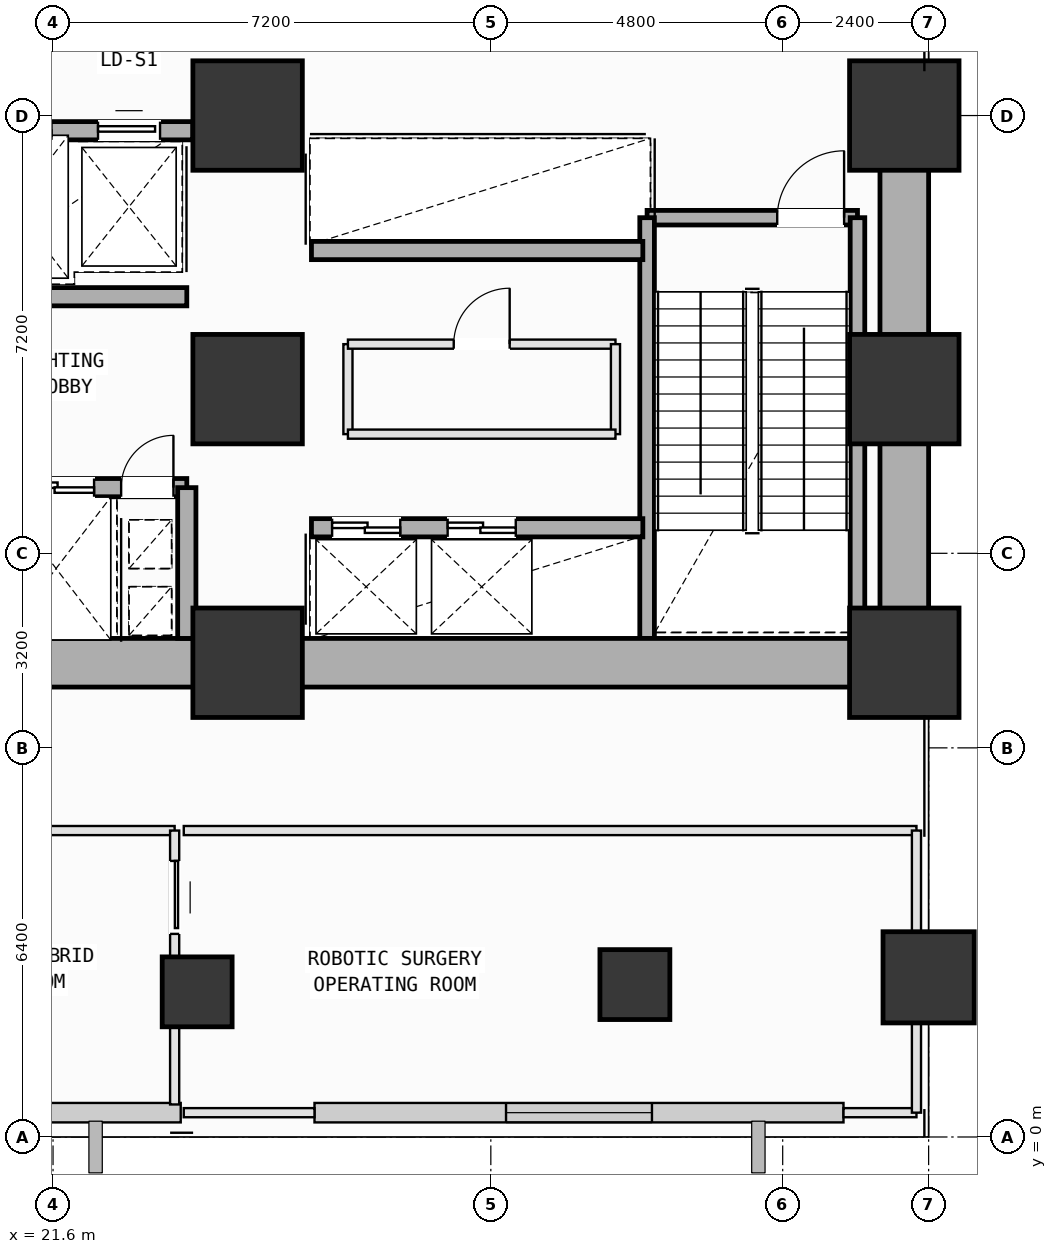
"""IFC4 building model, lengths in metres.
Left out: names, types, materials, properties, quantities, classifications, styles, units other than length and angle.
Written with IfcOpenShell. Run it as: python <this file> out.ifc"""

import sys

from ifc_helpers import new_model, si_unit, direction, frame, frame_2d, origin, origin_2d, place, context, subcontext, project, spatial, rectangle, extrude, element, fill, save


model = new_model("IFC4")
c1 = context("Model", 3, precision=1e-05, world=origin(), true_north=direction((0.0, 1.0)))
c2 = subcontext(c1, "Body", "Model", "MODEL_VIEW")
j1 = project(units=[si_unit("LENGTHUNIT", "METRE"), si_unit("PLANEANGLEUNIT", "RADIAN")], contexts=[c1])
p1 = place(None, origin())
s1 = spatial("IfcSite", under=j1, at=p1, CompositionType="ELEMENT")
p2 = place(p1, origin())
s2 = spatial("IfcBuilding", under=s1, at=p2, CompositionType="ELEMENT")
p3 = place(p2, frame((0.0, 0.0, 21.6)))
s3 = spatial("IfcBuildingStorey", under=s2, at=p3, CompositionType="ELEMENT", Elevation=21.6)
for number, where, z_axis, x_axis in (
    (1, (24.8, 7.8, 0.0), (0.0, 0.0, 1.0), (1.0, 0.0, 0.0)),
    (2, (24.8, 12.3, 0.0), (0.0, 0.0, 1.0), (1.0, 0.0, 0.0)),
    (3, (24.8, 16.8, 0.0), (0.0, 0.0, 1.0), (1.0, 0.0, 0.0)),
    (4, (35.6, 7.8, 0.0), (0.0, 0.0, 1.0), (1.0, 0.0, 0.0)),
    (5, (35.6, 12.3, 0.0), (0.0, 0.0, 1.0), (1.0, 0.0, 0.0)),
    (6, (35.6, 16.8, 0.0), (0.0, 0.0, 1.0), (1.0, 0.0, 0.0)),
):
    element("IfcColumn", number, at=place(p3, frame(where, z_axis=z_axis, x_axis=x_axis)), inside=s3, PredefinedType="COLUMN", context=c2, shape_type="SweptSolid", body=[
        extrude(rectangle(XDim=1.8, YDim=1.8, at=origin_2d()), origin(), (0.0, 0.0, 1.0), 5.4),
    ])
p4 = place(p3, frame((36.0, 2.626, 0.0), z_axis=(0.0, 0.0, 1.0), x_axis=(1.0, 0.0, 0.0)))
e7 = element("IfcColumn", 7, at=p4, inside=s3, PredefinedType="PILASTER", context=c2, shape_type="SweptSolid", body=[
    extrude(rectangle(XDim=1.5, YDim=1.5, at=origin_2d()), origin(), (0.0, 0.0, 1.0), 5.4),
])
for number, where, z_axis, x_axis in (
    (8, (23.97, 2.387, 0.0), (0.0, 0.0, 1.0), (1.0, 0.0, 0.0)),
    (9, (31.169, 2.507, 0.0), (0.0, 0.0, 1.0), (1.0, 0.0, 0.0)),
):
    element("IfcColumn", number, at=place(p3, frame(where, z_axis=z_axis, x_axis=x_axis)), inside=s3, PredefinedType="COLUMN", context=c2, shape_type="SweptSolid", body=[
        extrude(rectangle(XDim=1.15, YDim=1.15, at=origin_2d()), origin(), (0.0, 0.0, 1.0), 5.4),
    ])
p5 = place(p3, frame((23.7, 0.4, 0.0), z_axis=(0.0, 0.0, 1.0), x_axis=(-1.0, 0.0, 0.0)))
e10 = element("IfcWall", 10, at=p5, inside=s3, PredefinedType="SOLIDWALL", context=c2, shape_type="SweptSolid", body=[
    extrude(rectangle(XDim=8.6, YDim=0.32, at=frame_2d((4.3, 0.0))), origin(), (0.0, 0.0, 1.0), 4.18),
])
p6 = place(p5, frame((3.315, 0.0, 0.8)))
e11 = element("IfcOpeningElement", 11, at=p6, cuts=e10, PredefinedType="OPENING", context=c2, shape_type="SweptSolid", body=[
    extrude(rectangle(XDim=2.4, YDim=2.2, at=frame_2d((1.2, 1.1))), frame((0.0, 0.17, 0.0), z_axis=(0.0, -1.0, 0.0), x_axis=(1.0, 0.0, 0.0)), (0.0, 0.0, 1.0), 0.34),
])
p7 = place(p3, frame((34.6, 0.4, 0.0), z_axis=(0.0, 0.0, 1.0), x_axis=(-1.0, 0.0, 0.0)))
e12 = element("IfcWall", 12, at=p7, inside=s3, PredefinedType="SOLIDWALL", context=c2, shape_type="SweptSolid", body=[
    extrude(rectangle(XDim=8.7, YDim=0.32, at=frame_2d((4.35, 0.0))), origin(), (0.0, 0.0, 1.0), 4.18),
])
p8 = place(p7, frame((3.15, 0.0, 0.8)))
e13 = element("IfcOpeningElement", 13, at=p8, cuts=e12, PredefinedType="OPENING", context=c2, shape_type="SweptSolid", body=[
    extrude(rectangle(XDim=2.4, YDim=2.2, at=frame_2d((1.2, 1.1))), frame((0.0, 0.17, 0.0), z_axis=(0.0, -1.0, 0.0), x_axis=(1.0, 0.0, 0.0)), (0.0, 0.0, 1.0), 0.34),
])
p9 = place(p3, frame((31.37, 15.12, 0.0), z_axis=(0.0, 0.0, 1.0), x_axis=(1.0, 0.0, 0.0)))
e14 = element("IfcWall", 14, at=p9, inside=s3, PredefinedType="SOLIDWALL", context=c2, shape_type="SweptSolid", body=[
    extrude(rectangle(XDim=3.46, YDim=0.24, at=frame_2d((1.73, 0.0))), origin(), (0.0, 0.0, 1.0), 5.1),
])
p10 = place(p9, frame((2.14, 0.0, 0.0)))
e15 = element("IfcOpeningElement", 15, at=p10, cuts=e14, PredefinedType="OPENING", context=c2, shape_type="SweptSolid", body=[
    extrude(rectangle(XDim=1.1, YDim=2.15, at=frame_2d((0.55, 1.075))), frame((0.0, 0.13, 0.0), z_axis=(0.0, -1.0, 0.0), x_axis=(1.0, 0.0, 0.0)), (0.0, 0.0, 1.0), 0.26),
])
for number, where, z_axis, x_axis in (
    (16, (34.83, 15.12, 0.0), (0.0, 0.0, 1.0), (0.0, -1.0, 0.0)),
    (17, (31.37, 8.2, 0.0), (0.0, 0.0, 1.0), (0.0, 1.0, 0.0)),
):
    element("IfcWall", number, at=place(p3, frame(where, z_axis=z_axis, x_axis=x_axis)), inside=s3, PredefinedType="SOLIDWALL", context=c2, shape_type="SweptSolid", body=[
        extrude(rectangle(XDim=6.92, YDim=0.24, at=frame_2d((3.46, 0.0))), origin(), (0.0, 0.0, 1.0), 5.1),
    ])
for number, where, z_axis, x_axis in (
    (18, (14.0, 7.8, 0.0), (0.0, 0.0, 1.0), (1.0, 0.0, 0.0)),
    (19, (24.8, 7.8, 0.0), (0.0, 0.0, 1.0), (1.0, 0.0, 0.0)),
):
    element("IfcWall", number, at=place(p3, frame(where, z_axis=z_axis, x_axis=x_axis)), inside=s3, PredefinedType="SHEAR", context=c2, shape_type="SweptSolid", body=[
        extrude(rectangle(XDim=10.8, YDim=0.8, at=frame_2d((5.4, 0.0))), origin(), (0.0, 0.0, 1.0), 5.1),
    ])
p11 = place(p3, frame((35.6, 7.8, 0.0), z_axis=(0.0, 0.0, 1.0), x_axis=(0.0, 1.0, 0.0)))
e20 = element("IfcWall", 20, at=p11, inside=s3, PredefinedType="SHEAR", context=c2, shape_type="SweptSolid", body=[
    extrude(rectangle(XDim=9.0, YDim=0.8, at=frame_2d((4.5, 0.0))), origin(), (0.0, 0.0, 1.0), 5.1),
])
p12 = place(p3, frame((19.85, 16.55, 0.0), z_axis=(0.0, 0.0, 1.0), x_axis=(1.0, 0.0, 0.0)))
e21 = element("IfcWall", 21, at=p12, inside=s3, PredefinedType="SOLIDWALL", context=c2, shape_type="SweptSolid", body=[
    extrude(rectangle(XDim=4.05, YDim=0.3, at=frame_2d((2.025, 0.0))), origin(), (0.0, 0.0, 1.0), 5.1),
])
p13 = place(p12, frame((0.475, 0.0, 0.0)))
e22 = element("IfcOpeningElement", 22, at=p13, cuts=e21, PredefinedType="OPENING", context=c2, shape_type="SweptSolid", body=[
    extrude(rectangle(XDim=1.25, YDim=2.18, at=frame_2d((0.625, 1.09))), frame((0.0, 0.16, 0.0), z_axis=(0.0, -1.0, 0.0), x_axis=(1.0, 0.0, 0.0)), (0.0, 0.0, 1.0), 0.32),
])
p14 = place(p12, frame((2.49, 0.0, 0.0)))
e23 = element("IfcOpeningElement", 23, at=p14, cuts=e21, PredefinedType="OPENING", context=c2, shape_type="SweptSolid", body=[
    extrude(rectangle(XDim=1.02, YDim=2.12, at=frame_2d((0.51, 1.06))), frame((0.0, 0.16, 0.0), z_axis=(0.0, -1.0, 0.0), x_axis=(1.0, 0.0, 0.0)), (0.0, 0.0, 1.0), 0.32),
])
p15 = place(p3, frame((18.5, 10.68, 0.0), z_axis=(0.0, 0.0, 1.0), x_axis=(1.0, 0.0, 0.0)))
e24 = element("IfcWall", 24, at=p15, inside=s3, PredefinedType="SOLIDWALL", context=c2, shape_type="SweptSolid", body=[
    extrude(rectangle(XDim=5.3, YDim=0.3, at=frame_2d((2.65, 0.0))), origin(), (0.0, 0.0, 1.0), 5.1),
])
p16 = place(p15, frame((4.22, 0.0, 0.0)))
e25 = element("IfcOpeningElement", 25, at=p16, cuts=e24, PredefinedType="OPENING", context=c2, shape_type="SweptSolid", body=[
    extrude(rectangle(XDim=0.86, YDim=2.06, at=frame_2d((0.43, 1.03))), frame((0.0, 0.16, 0.0), z_axis=(0.0, -1.0, 0.0), x_axis=(1.0, 0.0, 0.0)), (0.0, 0.0, 1.0), 0.32),
])
p17 = place(p15, frame((0.425, 0.0, 0.0)))
e26 = element("IfcOpeningElement", 26, at=p17, cuts=e24, PredefinedType="OPENING", context=c2, shape_type="SweptSolid", body=[
    extrude(rectangle(XDim=1.25, YDim=2.18, at=frame_2d((0.625, 1.09))), frame((0.0, 0.16, 0.0), z_axis=(0.0, -1.0, 0.0), x_axis=(1.0, 0.0, 0.0)), (0.0, 0.0, 1.0), 0.32),
])
p18 = place(p15, frame((2.525, 0.0, 0.0)))
e27 = element("IfcOpeningElement", 27, at=p18, cuts=e24, PredefinedType="OPENING", context=c2, shape_type="SweptSolid", body=[
    extrude(rectangle(XDim=1.25, YDim=2.18, at=frame_2d((0.625, 1.09))), frame((0.0, 0.16, 0.0), z_axis=(0.0, -1.0, 0.0), x_axis=(1.0, 0.0, 0.0)), (0.0, 0.0, 1.0), 0.32),
])
p19 = place(p3, frame((18.5, 13.82, 0.0), z_axis=(0.0, 0.0, 1.0), x_axis=(1.0, 0.0, 0.0)))
e28 = element("IfcWall", 28, at=p19, inside=s3, PredefinedType="SOLIDWALL", context=c2, shape_type="SweptSolid", body=[
    extrude(rectangle(XDim=5.3, YDim=0.3, at=frame_2d((2.65, 0.0))), origin(), (0.0, 0.0, 1.0), 5.1),
])
p20 = place(p19, frame((0.18, 0.0, 0.0)))
e29 = element("IfcOpeningElement", 29, at=p20, cuts=e28, PredefinedType="OPENING", context=c2, shape_type="SweptSolid", body=[
    extrude(rectangle(XDim=1.1, YDim=2.15, at=frame_2d((0.55, 1.075))), frame((0.0, 0.16, 0.0), z_axis=(0.0, -1.0, 0.0), x_axis=(1.0, 0.0, 0.0)), (0.0, 0.0, 1.0), 0.32),
])
p21 = place(p3, frame((23.8, 8.2, 0.0), z_axis=(0.0, 0.0, 1.0), x_axis=(0.0, 1.0, 0.0)))
e30 = element("IfcWall", 30, at=p21, inside=s3, PredefinedType="SOLIDWALL", context=c2, shape_type="SweptSolid", body=[
    extrude(rectangle(XDim=2.48, YDim=0.3, at=frame_2d((1.24, 0.0))), origin(), (0.0, 0.0, 1.0), 5.1),
])
p22 = place(p3, frame((25.85, 10.02, 0.0), z_axis=(0.0, 0.0, 1.0), x_axis=(1.0, 0.0, 0.0)))
e31 = element("IfcWall", 31, at=p22, inside=s3, PredefinedType="SOLIDWALL", context=c2, shape_type="SweptSolid", body=[
    extrude(rectangle(XDim=5.45, YDim=0.3, at=frame_2d((2.725, 0.0))), origin(), (0.0, 0.0, 1.0), 5.1),
])
p23 = place(p22, frame((0.34, 0.0, 0.0)))
e32 = element("IfcOpeningElement", 32, at=p23, cuts=e31, PredefinedType="OPENING", context=c2, shape_type="SweptSolid", body=[
    extrude(rectangle(XDim=1.12, YDim=2.15, at=frame_2d((0.56, 1.075))), frame((0.0, 0.16, 0.0), z_axis=(0.0, -1.0, 0.0), x_axis=(1.0, 0.0, 0.0)), (0.0, 0.0, 1.0), 0.32),
])
p24 = place(p22, frame((2.24, 0.0, 0.0)))
e33 = element("IfcOpeningElement", 33, at=p24, cuts=e31, PredefinedType="OPENING", context=c2, shape_type="SweptSolid", body=[
    extrude(rectangle(XDim=1.12, YDim=2.15, at=frame_2d((0.56, 1.075))), frame((0.0, 0.16, 0.0), z_axis=(0.0, -1.0, 0.0), x_axis=(1.0, 0.0, 0.0)), (0.0, 0.0, 1.0), 0.32),
])
p25 = place(p3, frame((25.85, 14.58, 0.0), z_axis=(0.0, 0.0, 1.0), x_axis=(1.0, 0.0, 0.0)))
e34 = element("IfcWall", 34, at=p25, inside=s3, PredefinedType="SOLIDWALL", context=c2, shape_type="SweptSolid", body=[
    extrude(rectangle(XDim=5.45, YDim=0.3, at=frame_2d((2.725, 0.0))), origin(), (0.0, 0.0, 1.0), 5.1),
])
p26 = place(p3, frame((26.45, 11.56, 0.0), z_axis=(0.0, 0.0, 1.0), x_axis=(0.0, 1.0, 0.0)))
e35 = element("IfcWall", 35, at=p26, inside=s3, PredefinedType="PARTITIONING", context=c2, shape_type="SweptSolid", body=[
    extrude(rectangle(XDim=1.48, YDim=0.15, at=frame_2d((0.74, 0.0))), origin(), (0.0, 0.0, 1.0), 5.1),
])
p27 = place(p3, frame((26.45, 13.04, 0.0), z_axis=(0.0, 0.0, 1.0), x_axis=(1.0, 0.0, 0.0)))
e36 = element("IfcWall", 36, at=p27, inside=s3, PredefinedType="PARTITIONING", context=c2, shape_type="SweptSolid", body=[
    extrude(rectangle(XDim=4.4, YDim=0.15, at=frame_2d((2.2, 0.0))), origin(), (0.0, 0.0, 1.0), 5.1),
])
p28 = place(p27, frame((1.74, 0.0, 0.0)))
e37 = element("IfcOpeningElement", 37, at=p28, cuts=e36, PredefinedType="OPENING", context=c2, shape_type="SweptSolid", body=[
    extrude(rectangle(XDim=0.92, YDim=2.1, at=frame_2d((0.46, 1.05))), frame((0.0, 0.085, 0.0), z_axis=(0.0, -1.0, 0.0), x_axis=(1.0, 0.0, 0.0)), (0.0, 0.0, 1.0), 0.17),
])
p29 = place(p3, frame((30.85, 13.04, 0.0), z_axis=(0.0, 0.0, 1.0), x_axis=(0.0, -1.0, 0.0)))
e38 = element("IfcWall", 38, at=p29, inside=s3, PredefinedType="PARTITIONING", context=c2, shape_type="SweptSolid", body=[
    extrude(rectangle(XDim=1.48, YDim=0.15, at=frame_2d((0.74, 0.0))), origin(), (0.0, 0.0, 1.0), 5.1),
])
p30 = place(p3, frame((30.85, 11.56, 0.0), z_axis=(0.0, 0.0, 1.0), x_axis=(-1.0, 0.0, 0.0)))
e39 = element("IfcWall", 39, at=p30, inside=s3, PredefinedType="PARTITIONING", context=c2, shape_type="SweptSolid", body=[
    extrude(rectangle(XDim=4.4, YDim=0.15, at=frame_2d((2.2, 0.0))), origin(), (0.0, 0.0, 1.0), 5.1),
])
p31 = place(p3, frame((11.95, 5.04, 0.0), z_axis=(0.0, 0.0, 1.0), x_axis=(1.0, 0.0, 0.0)))
e40 = element("IfcWall", 40, at=p31, inside=s3, PredefinedType="PARTITIONING", context=c2, shape_type="SweptSolid", body=[
    extrude(rectangle(XDim=11.65, YDim=0.15, at=frame_2d((5.825, 0.0))), origin(), (0.0, 0.0, 1.0), 5.1),
])
p32 = place(p31, frame((5.225, 0.0, 0.0)))
e41 = element("IfcOpeningElement", 41, at=p32, cuts=e40, PredefinedType="OPENING", context=c2, shape_type="SweptSolid", body=[
    extrude(rectangle(XDim=1.2, YDim=2.15, at=frame_2d((0.6, 1.075))), frame((0.0, 0.085, 0.0), z_axis=(0.0, -1.0, 0.0), x_axis=(1.0, 0.0, 0.0)), (0.0, 0.0, 1.0), 0.17),
])
p33 = place(p3, frame((23.6, 5.04, 0.0), z_axis=(0.0, 0.0, 1.0), x_axis=(0.0, -1.0, 0.0)))
e42 = element("IfcWall", 42, at=p33, inside=s3, PredefinedType="PARTITIONING", context=c2, shape_type="SweptSolid", body=[
    extrude(rectangle(XDim=4.505, YDim=0.15, at=frame_2d((2.252, 0.0))), origin(), (0.0, 0.0, 1.0), 2.685),
])
p34 = place(p33, frame((0.5, 0.0, 0.0)))
e43 = element("IfcOpeningElement", 43, at=p34, cuts=e42, PredefinedType="OPENING", context=c2, shape_type="SweptSolid", body=[
    extrude(rectangle(XDim=1.2, YDim=2.15, at=frame_2d((0.6, 1.075))), frame((0.0, 0.085, 0.0), z_axis=(0.0, -1.0, 0.0), x_axis=(1.0, 0.0, 0.0)), (0.0, 0.0, 1.0), 0.17),
])
p35 = place(p3, frame((35.8, 0.4, 0.0), z_axis=(0.0, 0.0, 1.0), x_axis=(-1.0, 0.0, 0.0)))
e44 = element("IfcWall", 44, at=p35, inside=s3, PredefinedType="PARTITIONING", context=c2, shape_type="SweptSolid", body=[
    extrude(rectangle(XDim=1.2, YDim=0.15, at=frame_2d((0.6, 0.0))), origin(), (0.0, 0.0, 1.0), 5.1),
])
p36 = place(p3, frame((25.9, 0.4, 0.0), z_axis=(0.0, 0.0, 1.0), x_axis=(-1.0, 0.0, 0.0)))
e45 = element("IfcWall", 45, at=p36, inside=s3, PredefinedType="PARTITIONING", context=c2, shape_type="SweptSolid", body=[
    extrude(rectangle(XDim=2.15, YDim=0.15, at=frame_2d((1.075, 0.0))), origin(), (0.0, 0.0, 1.0), 5.1),
])
p37 = place(p3, frame((23.75, 5.04, 0.0), z_axis=(0.0, 0.0, 1.0), x_axis=(1.0, 0.0, 0.0)))
e46 = element("IfcWall", 46, at=p37, inside=s3, PredefinedType="PARTITIONING", context=c2, shape_type="SweptSolid", body=[
    extrude(rectangle(XDim=12.05, YDim=0.15, at=frame_2d((6.025, 0.0))), origin(), (0.0, 0.0, 1.0), 5.1),
])
p38 = place(p3, frame((35.8, 5.04, 0.0), z_axis=(0.0, 0.0, 1.0), x_axis=(0.0, -1.0, 0.0)))
e47 = element("IfcWall", 47, at=p38, inside=s3, PredefinedType="PARTITIONING", context=c2, shape_type="SweptSolid", body=[
    extrude(rectangle(XDim=4.64, YDim=0.15, at=frame_2d((2.32, 0.0))), origin(), (0.0, 0.0, 1.0), 2.685),
])
p39 = place(p8, origin())
e48 = element("IfcWindow", 48, at=p39, inside=s3, PartitioningType="SINGLE_PANEL", PredefinedType="WINDOW", context=c2, shape_type="SweptSolid", body=[
    extrude(rectangle(XDim=2.4, YDim=2.2, at=frame_2d((1.2, 1.1))), frame((0.0, 0.03, 0.0), z_axis=(0.0, -1.0, 0.0), x_axis=(1.0, 0.0, 0.0)), (0.0, 0.0, 1.0), 0.06),
])
fill(e13, e48)
p40 = place(p10, origin())
e49 = element("IfcDoor", 49, at=p40, inside=s3, OperationType="SINGLE_SWING_RIGHT", PredefinedType="DOOR", context=c2, shape_type="SweptSolid", body=[
    extrude(rectangle(XDim=1.1, YDim=2.15, at=frame_2d((0.55, 1.075))), frame((0.0, 0.025, 0.0), z_axis=(0.0, -1.0, 0.0), x_axis=(1.0, 0.0, 0.0)), (0.0, 0.0, 1.0), 0.05),
])
fill(e15, e49)
p41 = place(p16, origin())
e50 = element("IfcDoor", 50, at=p41, inside=s3, OperationType="SINGLE_SWING_RIGHT", PredefinedType="DOOR", context=c2, shape_type="SweptSolid", body=[
    extrude(rectangle(XDim=0.86, YDim=2.06, at=frame_2d((0.43, 1.03))), frame((0.0, 0.025, 0.0), z_axis=(0.0, -1.0, 0.0), x_axis=(1.0, 0.0, 0.0)), (0.0, 0.0, 1.0), 0.05),
])
fill(e25, e50)
p42 = place(p18, origin())
e51 = element("IfcDoor", 51, at=p42, inside=s3, OperationType="DOUBLE_DOOR_SLIDING", PredefinedType="DOOR", context=c2, shape_type="SweptSolid", body=[
    extrude(rectangle(XDim=1.25, YDim=2.18, at=frame_2d((0.625, 1.09))), frame((0.0, 0.025, 0.0), z_axis=(0.0, -1.0, 0.0), x_axis=(1.0, 0.0, 0.0)), (0.0, 0.0, 1.0), 0.05),
])
fill(e27, e51)
p43 = place(p23, origin())
e52 = element("IfcDoor", 52, at=p43, inside=s3, OperationType="DOUBLE_DOOR_SLIDING", PredefinedType="DOOR", context=c2, shape_type="SweptSolid", body=[
    extrude(rectangle(XDim=1.12, YDim=2.15, at=frame_2d((0.56, 1.075))), frame((0.0, 0.025, 0.0), z_axis=(0.0, -1.0, 0.0), x_axis=(1.0, 0.0, 0.0)), (0.0, 0.0, 1.0), 0.05),
])
fill(e32, e52)
p44 = place(p24, origin())
e53 = element("IfcDoor", 53, at=p44, inside=s3, OperationType="DOUBLE_DOOR_SLIDING", PredefinedType="DOOR", context=c2, shape_type="SweptSolid", body=[
    extrude(rectangle(XDim=1.12, YDim=2.15, at=frame_2d((0.56, 1.075))), frame((0.0, 0.025, 0.0), z_axis=(0.0, -1.0, 0.0), x_axis=(1.0, 0.0, 0.0)), (0.0, 0.0, 1.0), 0.05),
])
fill(e33, e53)
p45 = place(p14, origin())
e54 = element("IfcDoor", 54, at=p45, inside=s3, OperationType="SLIDING_TO_LEFT", PredefinedType="DOOR", context=c2, shape_type="SweptSolid", body=[
    extrude(rectangle(XDim=1.02, YDim=2.12, at=frame_2d((0.51, 1.06))), frame((0.0, 0.025, 0.0), z_axis=(0.0, -1.0, 0.0), x_axis=(1.0, 0.0, 0.0)), (0.0, 0.0, 1.0), 0.05),
])
fill(e23, e54)
p46 = place(p28, origin())
e55 = element("IfcDoor", 55, at=p46, inside=s3, OperationType="SINGLE_SWING_RIGHT", PredefinedType="DOOR", context=c2, shape_type="SweptSolid", body=[
    extrude(rectangle(XDim=0.92, YDim=2.1, at=frame_2d((0.46, 1.05))), frame((0.0, 0.025, 0.0), z_axis=(0.0, -1.0, 0.0), x_axis=(1.0, 0.0, 0.0)), (0.0, 0.0, 1.0), 0.05),
])
fill(e37, e55)
p47 = place(p34, origin())
e56 = element("IfcDoor", 56, at=p47, inside=s3, OperationType="SLIDING_TO_LEFT", PredefinedType="DOOR", context=c2, shape_type="SweptSolid", body=[
    extrude(rectangle(XDim=1.2, YDim=2.15, at=frame_2d((0.6, 1.075))), frame((0.0, 0.025, 0.0), z_axis=(0.0, -1.0, 0.0), x_axis=(1.0, 0.0, 0.0)), (0.0, 0.0, 1.0), 0.05),
])
fill(e43, e56)
save(model, sys.argv[1])
